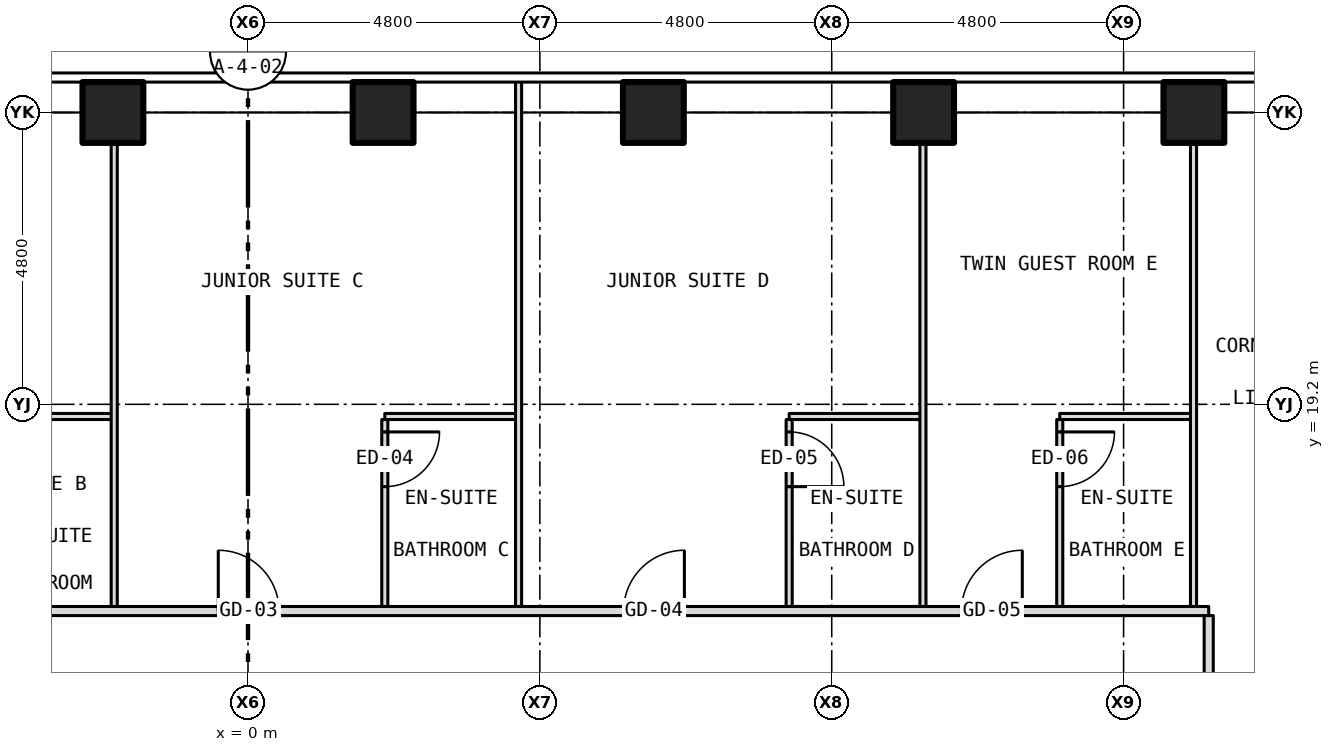
"""IFC4 building model, lengths in metres.
Left out: names, types, materials, properties, quantities, classifications, styles, units other than length and angle.
Written with IfcOpenShell. Run it as: python <this file> out.ifc"""

import sys

from ifc_helpers import new_model, si_unit, direction, frame, frame_2d, origin, origin_2d, place, context, subcontext, project, spatial, rectangle, hollow_rectangle, extrude, element, fill, save


model = new_model("IFC4")
c1 = context("Model", 3, precision=1e-05, world=origin(), true_north=direction((0.0, 1.0)))
c2 = subcontext(c1, "Body", "Model", "MODEL_VIEW")
j1 = project(units=[si_unit("LENGTHUNIT", "METRE"), si_unit("PLANEANGLEUNIT", "RADIAN")], contexts=[c1])
p1 = place(None, origin())
s1 = spatial("IfcSite", under=j1, at=p1, CompositionType="ELEMENT")
p2 = place(p1, origin())
s2 = spatial("IfcBuilding", under=s1, at=p2, CompositionType="ELEMENT")
p3 = place(p2, frame((0.0, 0.0, 42.5)))
s3 = spatial("IfcBuildingStorey", under=s2, at=p3, CompositionType="ELEMENT", Elevation=42.5)
for number, where, z_axis, x_axis in (
    (1, (-2.222, 24.0, -0.15), (0.0, 0.0, 1.0), (1.0, 0.0, 0.0)),
    (2, (2.222, 24.0, -0.15), (0.0, 0.0, 1.0), (1.0, 0.0, 0.0)),
    (3, (6.667, 24.0, -0.15), (0.0, 0.0, 1.0), (1.0, 0.0, 0.0)),
    (4, (11.111, 24.0, -0.15), (0.0, 0.0, 1.0), (1.0, 0.0, 0.0)),
    (5, (15.556, 24.0, -0.15), (0.0, 0.0, 1.0), (1.0, 0.0, 0.0)),
):
    element("IfcColumn", number, at=place(p3, frame(where, z_axis=z_axis, x_axis=x_axis)), inside=s3, PredefinedType="COLUMN", context=c2, shape_type="SweptSolid", body=[
        extrude(hollow_rectangle(XDim=1.0, YDim=1.0, WallThickness=0.06, at=origin_2d()), origin(), (0.0, 0.0, 1.0), 3.5),
    ])
p4 = place(p3, frame((-15.8, 15.8, 0.0), z_axis=(0.0, 0.0, 1.0), x_axis=(1.0, 0.0, 0.0)))
e6 = element("IfcWall", 6, at=p4, inside=s3, PredefinedType="PARTITIONING", context=c2, shape_type="SweptSolid", body=[
    extrude(rectangle(XDim=31.6, YDim=0.15, at=frame_2d((15.8, 0.0))), origin(), (0.0, 0.0, 1.0), 3.35),
])
p5 = place(p4, frame((3.067, 0.0, 0.0)))
e7 = element("IfcOpeningElement", 7, at=p5, cuts=e6, PredefinedType="OPENING", context=c2, shape_type="SweptSolid", body=[
    extrude(rectangle(XDim=1.0, YDim=2.1, at=frame_2d((0.5, 1.05))), frame((0.0, 0.087, 0.0), z_axis=(0.0, -1.0, 0.0), x_axis=(1.0, 0.0, 0.0)), (0.0, 0.0, 1.0), 0.174),
])
p6 = place(p4, frame((6.189, 0.0, 0.0)))
e8 = element("IfcOpeningElement", 8, at=p6, cuts=e6, PredefinedType="OPENING", context=c2, shape_type="SweptSolid", body=[
    extrude(rectangle(XDim=1.0, YDim=2.1, at=frame_2d((0.5, 1.05))), frame((0.0, 0.087, 0.0), z_axis=(0.0, -1.0, 0.0), x_axis=(1.0, 0.0, 0.0)), (0.0, 0.0, 1.0), 0.174),
])
p7 = place(p4, frame((15.311, 0.0, 0.0)))
e9 = element("IfcOpeningElement", 9, at=p7, cuts=e6, PredefinedType="OPENING", context=c2, shape_type="SweptSolid", body=[
    extrude(rectangle(XDim=1.0, YDim=2.1, at=frame_2d((0.5, 1.05))), frame((0.0, 0.087, 0.0), z_axis=(0.0, -1.0, 0.0), x_axis=(1.0, 0.0, 0.0)), (0.0, 0.0, 1.0), 0.174),
])
p8 = place(p4, frame((21.977, 0.0, 0.0)))
e10 = element("IfcOpeningElement", 10, at=p8, cuts=e6, PredefinedType="OPENING", context=c2, shape_type="SweptSolid", body=[
    extrude(rectangle(XDim=1.0, YDim=2.1, at=frame_2d((0.5, 1.05))), frame((0.0, 0.087, 0.0), z_axis=(0.0, -1.0, 0.0), x_axis=(1.0, 0.0, 0.0)), (0.0, 0.0, 1.0), 0.174),
])
p9 = place(p4, frame((27.534, 0.0, 0.0)))
e11 = element("IfcOpeningElement", 11, at=p9, cuts=e6, PredefinedType="OPENING", context=c2, shape_type="SweptSolid", body=[
    extrude(rectangle(XDim=1.0, YDim=2.1, at=frame_2d((0.5, 1.05))), frame((0.0, 0.087, 0.0), z_axis=(0.0, -1.0, 0.0), x_axis=(1.0, 0.0, 0.0)), (0.0, 0.0, 1.0), 0.174),
])
for number, where, z_axis, x_axis in (
    (12, (-4.4, 19.0, 0.0), (0.0, 0.0, 1.0), (1.0, 0.0, 0.0)),
    (13, (2.25, 19.0, 0.0), (0.0, 0.0, 1.0), (1.0, 0.0, 0.0)),
):
    element("IfcWall", number, at=place(p3, frame(where, z_axis=z_axis, x_axis=x_axis)), inside=s3, PredefinedType="PARTITIONING", context=c2, shape_type="SweptSolid", body=[
        extrude(rectangle(XDim=2.2, YDim=0.1, at=frame_2d((1.1, 0.0))), origin(), (0.0, 0.0, 1.0), 3.35),
    ])
p10 = place(p3, frame((8.9, 19.0, 0.0), z_axis=(0.0, 0.0, 1.0), x_axis=(1.0, 0.0, 0.0)))
e14 = element("IfcWall", 14, at=p10, inside=s3, PredefinedType="PARTITIONING", context=c2, shape_type="SweptSolid", body=[
    extrude(rectangle(XDim=2.2, YDim=0.1, at=frame_2d((1.1, 0.0))), origin(), (0.0, 0.0, 1.0), 3.35),
])
p11 = place(p3, frame((13.35, 19.0, 0.0), z_axis=(0.0, 0.0, 1.0), x_axis=(1.0, 0.0, 0.0)))
e15 = element("IfcWall", 15, at=p11, inside=s3, PredefinedType="PARTITIONING", context=c2, shape_type="SweptSolid", body=[
    extrude(rectangle(XDim=2.2, YDim=0.1, at=frame_2d((1.1, 0.0))), origin(), (0.0, 0.0, 1.0), 3.35),
])
p12 = place(p3, frame((-2.2, 15.875, 0.0), z_axis=(0.0, 0.0, 1.0), x_axis=(0.0, 1.0, 0.0)))
e16 = element("IfcWall", 16, at=p12, inside=s3, PredefinedType="PARTITIONING", context=c2, shape_type="SweptSolid", body=[
    extrude(rectangle(XDim=8.005, YDim=0.1, at=frame_2d((4.002, 0.0))), origin(), (0.0, 0.0, 1.0), 3.35),
])
p13 = place(p3, frame((2.25, 15.875, 0.0), z_axis=(0.0, 0.0, 1.0), x_axis=(0.0, 1.0, 0.0)))
e17 = element("IfcWall", 17, at=p13, inside=s3, PredefinedType="PARTITIONING", context=c2, shape_type="SweptSolid", body=[
    extrude(rectangle(XDim=3.075, YDim=0.1, at=frame_2d((1.538, 0.0))), origin(), (0.0, 0.0, 1.0), 3.35),
])
p14 = place(p13, frame((1.971, 0.0, 0.0)))
e18 = element("IfcOpeningElement", 18, at=p14, cuts=e17, PredefinedType="OPENING", context=c2, shape_type="SweptSolid", body=[
    extrude(rectangle(XDim=0.9, YDim=2.1, at=frame_2d((0.45, 1.05))), frame((0.0, 0.062, 0.0), z_axis=(0.0, -1.0, 0.0), x_axis=(1.0, 0.0, 0.0)), (0.0, 0.0, 1.0), 0.124),
])
p15 = place(p3, frame((4.45, 15.875, 0.0), z_axis=(0.0, 0.0, 1.0), x_axis=(0.0, 1.0, 0.0)))
e19 = element("IfcWall", 19, at=p15, inside=s3, PredefinedType="PARTITIONING", context=c2, shape_type="SweptSolid", body=[
    extrude(rectangle(XDim=8.655, YDim=0.1, at=frame_2d((4.328, 0.0))), origin(), (0.0, 0.0, 1.0), 3.35),
])
p16 = place(p3, frame((8.9, 15.875, 0.0), z_axis=(0.0, 0.0, 1.0), x_axis=(0.0, 1.0, 0.0)))
e20 = element("IfcWall", 20, at=p16, inside=s3, PredefinedType="PARTITIONING", context=c2, shape_type="SweptSolid", body=[
    extrude(rectangle(XDim=3.075, YDim=0.1, at=frame_2d((1.538, 0.0))), origin(), (0.0, 0.0, 1.0), 3.35),
])
p17 = place(p16, frame((1.971, 0.0, 0.0)))
e21 = element("IfcOpeningElement", 21, at=p17, cuts=e20, PredefinedType="OPENING", context=c2, shape_type="SweptSolid", body=[
    extrude(rectangle(XDim=0.9, YDim=2.1, at=frame_2d((0.45, 1.05))), frame((0.0, 0.062, 0.0), z_axis=(0.0, -1.0, 0.0), x_axis=(1.0, 0.0, 0.0)), (0.0, 0.0, 1.0), 0.124),
])
p18 = place(p3, frame((11.1, 15.875, 0.0), z_axis=(0.0, 0.0, 1.0), x_axis=(0.0, 1.0, 0.0)))
e22 = element("IfcWall", 22, at=p18, inside=s3, PredefinedType="PARTITIONING", context=c2, shape_type="SweptSolid", body=[
    extrude(rectangle(XDim=8.005, YDim=0.1, at=frame_2d((4.002, 0.0))), origin(), (0.0, 0.0, 1.0), 3.35),
])
p19 = place(p3, frame((13.35, 15.875, 0.0), z_axis=(0.0, 0.0, 1.0), x_axis=(0.0, 1.0, 0.0)))
e23 = element("IfcWall", 23, at=p19, inside=s3, PredefinedType="PARTITIONING", context=c2, shape_type="SweptSolid", body=[
    extrude(rectangle(XDim=3.075, YDim=0.1, at=frame_2d((1.538, 0.0))), origin(), (0.0, 0.0, 1.0), 3.35),
])
p20 = place(p19, frame((1.971, 0.0, 0.0)))
e24 = element("IfcOpeningElement", 24, at=p20, cuts=e23, PredefinedType="OPENING", context=c2, shape_type="SweptSolid", body=[
    extrude(rectangle(XDim=0.9, YDim=2.1, at=frame_2d((0.45, 1.05))), frame((0.0, 0.062, 0.0), z_axis=(0.0, -1.0, 0.0), x_axis=(1.0, 0.0, 0.0)), (0.0, 0.0, 1.0), 0.124),
])
p21 = place(p3, frame((15.55, 15.875, 0.0), z_axis=(0.0, 0.0, 1.0), x_axis=(0.0, 1.0, 0.0)))
e25 = element("IfcWall", 25, at=p21, inside=s3, PredefinedType="PARTITIONING", context=c2, shape_type="SweptSolid", body=[
    extrude(rectangle(XDim=8.005, YDim=0.1, at=frame_2d((4.002, 0.0))), origin(), (0.0, 0.0, 1.0), 3.35),
])
p22 = place(p3, frame((15.8, 10.92, 0.0), z_axis=(0.0, 0.0, 1.0), x_axis=(0.0, 1.0, 0.0)))
e26 = element("IfcWall", 26, at=p22, inside=s3, PredefinedType="PARTITIONING", context=c2, shape_type="SweptSolid", body=[
    extrude(rectangle(XDim=4.805, YDim=0.15, at=frame_2d((2.403, 0.0))), origin(), (0.0, 0.0, 1.0), 3.35),
])
p23 = place(p22, frame((0.78, 0.0, 0.0)))
e27 = element("IfcOpeningElement", 27, at=p23, cuts=e26, PredefinedType="OPENING", context=c2, shape_type="SweptSolid", body=[
    extrude(rectangle(XDim=1.0, YDim=2.1, at=frame_2d((0.5, 1.05))), frame((0.0, 0.087, 0.0), z_axis=(0.0, -1.0, 0.0), x_axis=(1.0, 0.0, 0.0)), (0.0, 0.0, 1.0), 0.174),
])
p24 = place(p7, origin())
e28 = element("IfcDoor", 28, at=p24, inside=s3, OperationType="SINGLE_SWING_LEFT", PredefinedType="DOOR", context=c2, shape_type="SweptSolid", body=[
    extrude(rectangle(XDim=1.0, YDim=2.1, at=frame_2d((0.5, 1.05))), frame((0.0, 0.025, 0.0), z_axis=(0.0, -1.0, 0.0), x_axis=(1.0, 0.0, 0.0)), (0.0, 0.0, 1.0), 0.05),
])
fill(e9, e28)
p25 = place(p14, origin())
e29 = element("IfcDoor", 29, at=p25, inside=s3, OperationType="SINGLE_SWING_RIGHT", PredefinedType="DOOR", context=c2, shape_type="SweptSolid", body=[
    extrude(rectangle(XDim=0.9, YDim=2.1, at=frame_2d((0.45, 1.05))), frame((0.0, 0.025, 0.0), z_axis=(0.0, -1.0, 0.0), x_axis=(1.0, 0.0, 0.0)), (0.0, 0.0, 1.0), 0.05),
])
fill(e18, e29)
p26 = place(p8, origin())
e30 = element("IfcDoor", 30, at=p26, inside=s3, OperationType="SINGLE_SWING_RIGHT", PredefinedType="DOOR", context=c2, shape_type="SweptSolid", body=[
    extrude(rectangle(XDim=1.0, YDim=2.1, at=frame_2d((0.5, 1.05))), frame((0.0, 0.025, 0.0), z_axis=(0.0, -1.0, 0.0), x_axis=(1.0, 0.0, 0.0)), (0.0, 0.0, 1.0), 0.05),
])
fill(e10, e30)
p27 = place(p17, origin())
e31 = element("IfcDoor", 31, at=p27, inside=s3, OperationType="SINGLE_SWING_LEFT", PredefinedType="DOOR", context=c2, shape_type="SweptSolid", body=[
    extrude(rectangle(XDim=0.9, YDim=2.1, at=frame_2d((0.45, 1.05))), frame((0.0, 0.025, 0.0), z_axis=(0.0, -1.0, 0.0), x_axis=(1.0, 0.0, 0.0)), (0.0, 0.0, 1.0), 0.05),
])
fill(e21, e31)
p28 = place(p9, origin())
e32 = element("IfcDoor", 32, at=p28, inside=s3, OperationType="SINGLE_SWING_RIGHT", PredefinedType="DOOR", context=c2, shape_type="SweptSolid", body=[
    extrude(rectangle(XDim=1.0, YDim=2.1, at=frame_2d((0.5, 1.05))), frame((0.0, 0.025, 0.0), z_axis=(0.0, -1.0, 0.0), x_axis=(1.0, 0.0, 0.0)), (0.0, 0.0, 1.0), 0.05),
])
fill(e11, e32)
p29 = place(p20, origin())
e33 = element("IfcDoor", 33, at=p29, inside=s3, OperationType="SINGLE_SWING_RIGHT", PredefinedType="DOOR", context=c2, shape_type="SweptSolid", body=[
    extrude(rectangle(XDim=0.9, YDim=2.1, at=frame_2d((0.45, 1.05))), frame((0.0, 0.025, 0.0), z_axis=(0.0, -1.0, 0.0), x_axis=(1.0, 0.0, 0.0)), (0.0, 0.0, 1.0), 0.05),
])
fill(e24, e33)
save(model, sys.argv[1])
